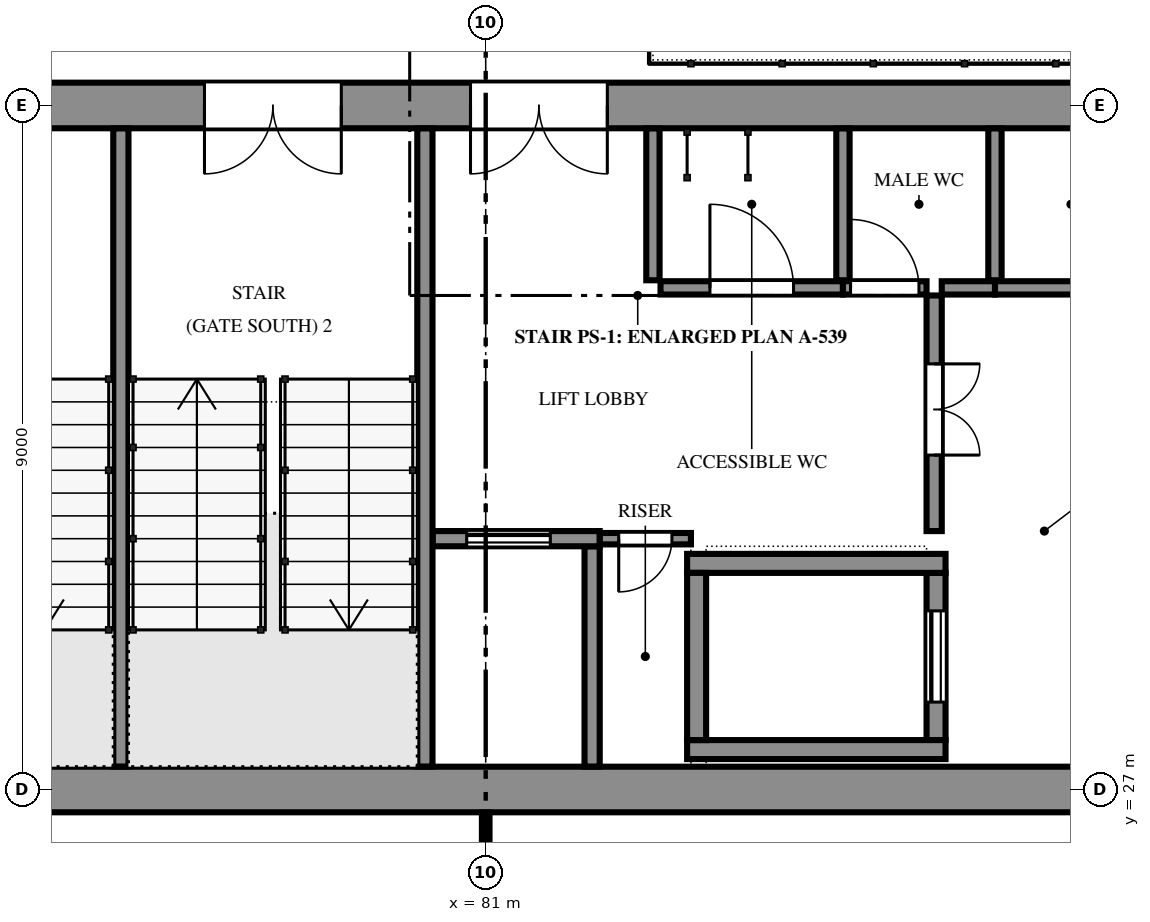
"""IFC4 building model, lengths in metres.
Left out: names, types, materials, properties, quantities, classifications, styles, units other than length and angle.
Written with IfcOpenShell. Run it as: python <this file> out.ifc"""

import sys

from ifc_helpers import new_model, si_unit, direction, frame, frame_2d, origin, place, context, subcontext, project, spatial, polyline, rectangle, outline, extrude, element, fill, save


model = new_model("IFC4")
c1 = context("Model", 3, precision=1e-05, world=origin(), true_north=direction((0.0, 1.0)))
c2 = subcontext(c1, "Body", "Model", "MODEL_VIEW")
j1 = project(units=[si_unit("LENGTHUNIT", "METRE"), si_unit("PLANEANGLEUNIT", "RADIAN")], contexts=[c1])
p1 = place(None, origin())
s1 = spatial("IfcSite", under=j1, at=p1, CompositionType="ELEMENT")
p2 = place(p1, origin())
s2 = spatial("IfcBuilding", under=s1, at=p2, CompositionType="ELEMENT")
p3 = place(p2, frame((0.0, 0.0, 7.5)))
s3 = spatial("IfcBuildingStorey", under=s2, at=p3, CompositionType="ELEMENT", Elevation=7.5)
p4 = place(p3, frame((71.7, 27.0, 0.0), z_axis=(0.0, 0.0, 1.0), x_axis=(1.0, 0.0, 0.0)))
e1 = element("IfcWall", 1, at=p4, inside=s3, PredefinedType="SOLIDWALL", context=c2, shape_type="SweptSolid", body=[
    extrude(rectangle(XDim=18.6, YDim=0.6, at=frame_2d((9.3, 0.0))), origin(), (0.0, 0.0, 1.0), 4.2),
])
p5 = place(p3, frame((71.7, 36.0, 0.0), z_axis=(0.0, 0.0, 1.0), x_axis=(1.0, 0.0, 0.0)))
e2 = element("IfcWall", 2, at=p5, inside=s3, PredefinedType="SOLIDWALL", context=c2, shape_type="SweptSolid", body=[
    extrude(rectangle(XDim=18.6, YDim=0.6, at=frame_2d((9.3, 0.0))), origin(), (0.0, 0.0, 1.0), 4.2),
])
p6 = place(p5, frame((1.6, 0.0, 0.0)))
e3 = element("IfcOpeningElement", 3, at=p6, cuts=e2, PredefinedType="OPENING", context=c2, shape_type="SweptSolid", body=[
    extrude(rectangle(XDim=1.8, YDim=2.1, at=frame_2d((0.9, 1.05))), frame((0.0, 0.31, 0.0), z_axis=(0.0, -1.0, 0.0), x_axis=(1.0, 0.0, 0.0)), (0.0, 0.0, 1.0), 0.62),
])
p7 = place(p5, frame((5.6, 0.0, 0.0)))
e4 = element("IfcOpeningElement", 4, at=p7, cuts=e2, PredefinedType="OPENING", context=c2, shape_type="SweptSolid", body=[
    extrude(rectangle(XDim=1.8, YDim=2.1, at=frame_2d((0.9, 1.05))), frame((0.0, 0.31, 0.0), z_axis=(0.0, -1.0, 0.0), x_axis=(1.0, 0.0, 0.0)), (0.0, 0.0, 1.0), 0.62),
])
p8 = place(p5, frame((9.1, 0.0, 0.0)))
e5 = element("IfcOpeningElement", 5, at=p8, cuts=e2, PredefinedType="OPENING", context=c2, shape_type="SweptSolid", body=[
    extrude(rectangle(XDim=1.8, YDim=2.1, at=frame_2d((0.9, 1.05))), frame((0.0, 0.31, 0.0), z_axis=(0.0, -1.0, 0.0), x_axis=(1.0, 0.0, 0.0)), (0.0, 0.0, 1.0), 0.62),
])
for number, where, z_axis, x_axis in (
    (6, (76.2, 27.302, -0.13), (0.0, 0.0, 1.0), (0.0, 1.0, 0.0)),
    (7, (80.2, 27.302, -0.13), (0.0, 0.0, 1.0), (0.0, 1.0, 0.0)),
):
    element("IfcWall", number, at=place(p3, frame(where, z_axis=z_axis, x_axis=x_axis)), inside=s3, PredefinedType="SOLIDWALL", context=c2, shape_type="SweptSolid", body=[
        extrude(rectangle(XDim=8.396, YDim=0.2, at=frame_2d((4.198, 0.0))), origin(), (0.0, 0.0, 1.0), 3.646),
    ])
p9 = place(p3, frame((80.302, 30.3, 0.0), z_axis=(0.0, 0.0, 1.0), x_axis=(1.0, 0.0, 0.0)))
e8 = element("IfcWall", 8, at=p9, inside=s3, PredefinedType="SOLIDWALL", context=c2, shape_type="SweptSolid", body=[
    extrude(rectangle(XDim=2.198, YDim=0.2, at=frame_2d((1.099, 0.0))), origin(), (0.0, 0.0, 1.0), 3.516),
])
p10 = place(p9, frame((0.448, 0.0, 0.0)))
e9 = element("IfcOpeningElement", 9, at=p10, cuts=e8, PredefinedType="OPENING", context=c2, shape_type="SweptSolid", body=[
    extrude(rectangle(XDim=1.1, YDim=2.1, at=frame_2d((0.55, 1.05))), frame((0.0, 0.11, 0.0), z_axis=(0.0, -1.0, 0.0), x_axis=(1.0, 0.0, 0.0)), (0.0, 0.0, 1.0), 0.22),
])
p11 = place(p3, frame((82.4, 27.302, 0.0), z_axis=(0.0, 0.0, 1.0), x_axis=(0.0, 1.0, 0.0)))
e10 = element("IfcWall", 10, at=p11, inside=s3, PredefinedType="SOLIDWALL", context=c2, shape_type="SweptSolid", body=[
    extrude(rectangle(XDim=2.898, YDim=0.2, at=frame_2d((1.449, 0.0))), origin(), (0.0, 0.0, 1.0), 3.516),
])
for number, where, z_axis, x_axis in (
    (11, (83.65, 27.525, 0.0), (0.0, 0.0, 1.0), (1.0, 0.0, 0.0)),
    (12, (83.65, 29.975, 0.0), (0.0, 0.0, 1.0), (1.0, 0.0, 0.0)),
):
    element("IfcWall", number, at=place(p3, frame(where, z_axis=z_axis, x_axis=x_axis)), inside=s3, PredefinedType="SOLIDWALL", context=c2, shape_type="SweptSolid", body=[
        extrude(rectangle(XDim=3.4, YDim=0.25, at=frame_2d((1.7, 0.0))), origin(), (0.0, 0.0, 1.0), 3.516),
    ])
p12 = place(p3, frame((83.775, 27.65, 0.0), z_axis=(0.0, 0.0, 1.0), x_axis=(0.0, 1.0, 0.0)))
e13 = element("IfcWall", 13, at=p12, inside=s3, PredefinedType="SOLIDWALL", context=c2, shape_type="SweptSolid", body=[
    extrude(rectangle(XDim=2.2, YDim=0.25, at=frame_2d((1.1, 0.0))), origin(), (0.0, 0.0, 1.0), 3.516),
])
p13 = place(p3, frame((86.925, 27.65, 0.0), z_axis=(0.0, 0.0, 1.0), x_axis=(0.0, 1.0, 0.0)))
e14 = element("IfcWall", 14, at=p13, inside=s3, PredefinedType="SOLIDWALL", context=c2, shape_type="SweptSolid", body=[
    extrude(rectangle(XDim=2.2, YDim=0.25, at=frame_2d((1.1, 0.0))), origin(), (0.0, 0.0, 1.0), 3.516),
])
p14 = place(p13, frame((0.5, 0.0, 0.0)))
e15 = element("IfcOpeningElement", 15, at=p14, cuts=e14, PredefinedType="OPENING", context=c2, shape_type="SweptSolid", body=[
    extrude(rectangle(XDim=1.2, YDim=2.1, at=frame_2d((0.6, 1.05))), frame((0.0, 0.135, 0.0), z_axis=(0.0, -1.0, 0.0), x_axis=(1.0, 0.0, 0.0)), (0.0, 0.0, 1.0), 0.27),
])
p15 = place(p3, frame((81.0, 26.698, 0.0), z_axis=(0.0, 0.0, 1.0), x_axis=(0.0, -1.0, 0.0)))
e16 = element("IfcWall", 16, at=p15, inside=s3, PredefinedType="PARTITIONING", context=c2, shape_type="SweptSolid", body=[
    extrude(rectangle(XDim=5.635, YDim=0.1, at=frame_2d((2.818, 0.0))), origin(), (0.0, 0.0, 1.0), 3.643),
])
p16 = place(p3, frame((83.7, 30.3, 0.0), z_axis=(0.0, 0.0, 1.0), x_axis=(-1.0, 0.0, 0.0)))
e17 = element("IfcWall", 17, at=p16, inside=s3, PredefinedType="SOLIDWALL", context=c2, shape_type="SweptSolid", body=[
    extrude(rectangle(XDim=1.198, YDim=0.15, at=frame_2d((0.599, 0.0))), origin(), (0.0, 0.0, 1.0), 3.516),
])
p17 = place(p16, frame((0.25, 0.0, 0.0)))
e18 = element("IfcOpeningElement", 18, at=p17, cuts=e17, PredefinedType="OPENING", context=c2, shape_type="SweptSolid", body=[
    extrude(rectangle(XDim=0.7, YDim=2.0, at=frame_2d((0.35, 1.0))), frame((0.0, 0.085, 0.0), z_axis=(0.0, -1.0, 0.0), x_axis=(1.0, 0.0, 0.0)), (0.0, 0.0, 1.0), 0.17),
])
p18 = place(p3, frame((86.9, 33.5, 0.0), z_axis=(0.0, 0.0, 1.0), x_axis=(0.0, -1.0, 0.0)))
e19 = element("IfcWall", 19, at=p18, inside=s3, PredefinedType="PARTITIONING", context=c2, shape_type="SweptSolid", body=[
    extrude(rectangle(XDim=3.1, YDim=0.2, at=frame_2d((1.55, 0.0))), origin(), (0.0, 0.0, 1.0), 3.382),
])
p19 = place(p18, frame((0.9, 0.0, 0.0)))
e20 = element("IfcOpeningElement", 20, at=p19, cuts=e19, PredefinedType="OPENING", context=c2, shape_type="SweptSolid", body=[
    extrude(rectangle(XDim=1.2, YDim=2.1, at=frame_2d((0.6, 1.05))), frame((0.0, 0.11, 0.0), z_axis=(0.0, -1.0, 0.0), x_axis=(1.0, 0.0, 0.0)), (0.0, 0.0, 1.0), 0.22),
])
p20 = place(p3, frame((83.2, 35.698, 0.0), z_axis=(0.0, 0.0, 1.0), x_axis=(0.0, -1.0, 0.0)))
e21 = element("IfcWall", 21, at=p20, inside=s3, PredefinedType="PARTITIONING", context=c2, shape_type="SweptSolid", body=[
    extrude(rectangle(XDim=1.998, YDim=0.175, at=frame_2d((0.999, 0.0))), origin(), (0.0, 0.0, 1.0), 3.307),
])
p21 = place(p3, frame((83.3, 33.6, 0.0), z_axis=(0.0, 0.0, 1.0), x_axis=(1.0, 0.0, 0.0)))
e22 = element("IfcWall", 22, at=p21, inside=s3, PredefinedType="PARTITIONING", context=c2, shape_type="SweptSolid", body=[
    extrude(rectangle(XDim=2.4, YDim=0.175, at=frame_2d((1.2, 0.0))), origin(), (0.0, 0.0, 1.0), 3.307),
])
p22 = place(p21, frame((0.65, 0.0, 0.0)))
e23 = element("IfcOpeningElement", 23, at=p22, cuts=e22, PredefinedType="OPENING", context=c2, shape_type="SweptSolid", body=[
    extrude(rectangle(XDim=1.1, YDim=2.1, at=frame_2d((0.55, 1.05))), frame((0.0, 0.097, 0.0), z_axis=(0.0, -1.0, 0.0), x_axis=(1.0, 0.0, 0.0)), (0.0, 0.0, 1.0), 0.195),
])
p23 = place(p3, frame((85.7, 33.6, 0.0), z_axis=(0.0, 0.0, 1.0), x_axis=(1.0, 0.0, 0.0)))
e24 = element("IfcWall", 24, at=p23, inside=s3, PredefinedType="PARTITIONING", context=c2, shape_type="SweptSolid", body=[
    extrude(rectangle(XDim=1.1, YDim=0.175, at=frame_2d((0.55, 0.0))), origin(), (0.0, 0.0, 1.0), 3.307),
])
p24 = place(p23, frame((0.1, 0.0, 0.0)))
e25 = element("IfcOpeningElement", 25, at=p24, cuts=e24, PredefinedType="OPENING", context=c2, shape_type="SweptSolid", body=[
    extrude(rectangle(XDim=0.9, YDim=2.1, at=frame_2d((0.45, 1.05))), frame((0.0, 0.097, 0.0), z_axis=(0.0, -1.0, 0.0), x_axis=(1.0, 0.0, 0.0)), (0.0, 0.0, 1.0), 0.195),
])
p25 = place(p3, frame((87.7, 33.6, 0.0), z_axis=(0.0, 0.0, 1.0), x_axis=(1.0, 0.0, 0.0)))
e26 = element("IfcWall", 26, at=p25, inside=s3, PredefinedType="PARTITIONING", context=c2, shape_type="SweptSolid", body=[
    extrude(rectangle(XDim=1.998, YDim=0.175, at=frame_2d((0.999, 0.0))), origin(), (0.0, 0.0, 1.0), 3.307),
])
p26 = place(p3, frame((87.0, 33.6, 0.0), z_axis=(0.0, 0.0, 1.0), x_axis=(1.0, 0.0, 0.0)))
e27 = element("IfcWall", 27, at=p26, inside=s3, PredefinedType="PARTITIONING", context=c2, shape_type="SweptSolid", body=[
    extrude(rectangle(XDim=0.7, YDim=0.175, at=frame_2d((0.35, 0.0))), origin(), (0.0, 0.0, 1.0), 3.307),
])
for number, where, z_axis, x_axis in (
    (28, (85.7, 35.698, 0.0), (0.0, 0.0, 1.0), (0.0, -1.0, 0.0)),
    (29, (87.7, 35.698, 0.0), (0.0, 0.0, 1.0), (0.0, -1.0, 0.0)),
):
    element("IfcWall", number, at=place(p3, frame(where, z_axis=z_axis, x_axis=x_axis)), inside=s3, PredefinedType="PARTITIONING", context=c2, shape_type="SweptSolid", body=[
        extrude(rectangle(XDim=1.998, YDim=0.175, at=frame_2d((0.999, 0.0))), origin(), (0.0, 0.0, 1.0), 3.307),
    ])
p27 = place(p10, origin())
e30 = element("IfcDoor", 30, at=p27, inside=s3, OperationType="SLIDING_TO_LEFT", PredefinedType="DOOR", context=c2, shape_type="SweptSolid", body=[
    extrude(outline(polyline([(0.0, 0.0), (0.07, 0.0), (0.07, 2.03), (1.03, 2.03), (1.03, 0.0), (1.1, 0.0), (1.1, 2.1), (0.0, 2.1), (0.0, 0.0)])), frame((0.0, 0.025, 0.0), z_axis=(0.0, -1.0, 0.0), x_axis=(1.0, 0.0, 0.0)), (0.0, 0.0, 1.0), 0.05),
    extrude(rectangle(XDim=0.524, YDim=2.016, at=frame_2d((0.336, 1.018))), frame((0.0, 0.018, 0.0), z_axis=(0.0, -1.0, 0.0), x_axis=(1.0, 0.0, 0.0)), (0.0, 0.0, 1.0), 0.016),
    extrude(rectangle(XDim=0.52, YDim=2.016, at=frame_2d((0.766, 1.018))), frame((0.0, -0.002, 0.0), z_axis=(0.0, -1.0, 0.0), x_axis=(1.0, 0.0, 0.0)), (0.0, 0.0, 1.0), 0.016),
])
fill(e9, e30)
p28 = place(p14, origin())
e31 = element("IfcDoor", 31, at=p28, inside=s3, OperationType="SLIDING_TO_LEFT", PredefinedType="DOOR", context=c2, shape_type="SweptSolid", body=[
    extrude(outline(polyline([(0.0, 0.0), (0.07, 0.0), (0.07, 2.03), (1.13, 2.03), (1.13, 0.0), (1.2, 0.0), (1.2, 2.1), (0.0, 2.1), (0.0, 0.0)])), frame((0.0, 0.025, 0.0), z_axis=(0.0, -1.0, 0.0), x_axis=(1.0, 0.0, 0.0)), (0.0, 0.0, 1.0), 0.05),
    extrude(rectangle(XDim=0.579, YDim=2.016, at=frame_2d((0.363, 1.018))), frame((0.0, 0.018, 0.0), z_axis=(0.0, -1.0, 0.0), x_axis=(1.0, 0.0, 0.0)), (0.0, 0.0, 1.0), 0.016),
    extrude(rectangle(XDim=0.575, YDim=2.016, at=frame_2d((0.839, 1.018))), frame((0.0, -0.002, 0.0), z_axis=(0.0, -1.0, 0.0), x_axis=(1.0, 0.0, 0.0)), (0.0, 0.0, 1.0), 0.016),
])
fill(e15, e31)
p29 = place(p7, frame((1.8, 0.0, 0.0), z_axis=(0.0, 0.0, 1.0), x_axis=(-1.0, 0.0, 0.0)))
e32 = element("IfcDoor", 32, at=p29, inside=s3, OperationType="DOUBLE_DOOR_SINGLE_SWING", PredefinedType="DOOR", context=c2, shape_type="SweptSolid", body=[
    extrude(outline(polyline([(0.0, 0.0), (0.07, 0.0), (0.07, 2.03), (1.73, 2.03), (1.73, 0.0), (1.8, 0.0), (1.8, 2.1), (0.0, 2.1), (0.0, 0.0)])), frame((0.0, 0.025, 0.0), z_axis=(0.0, -1.0, 0.0), x_axis=(1.0, 0.0, 0.0)), (0.0, 0.0, 1.0), 0.05),
    extrude(outline(polyline([(0.074, 0.01), (0.897, 0.01), (0.897, 2.026), (0.074, 2.026), (0.074, 0.01)]), holes=[polyline([(0.194, 0.16), (0.777, 0.16), (0.777, 1.01), (0.194, 1.01), (0.194, 0.16)]), polyline([(0.335, 1.16), (0.635, 1.16), (0.635, 1.76), (0.335, 1.76), (0.335, 1.16)])]), frame((0.0, 0.017, 0.0), z_axis=(0.0, -1.0, 0.0), x_axis=(1.0, 0.0, 0.0)), (0.0, 0.0, 1.0), 0.035),
    extrude(rectangle(XDim=0.583, YDim=0.85, at=frame_2d((0.485, 0.585))), frame((0.0, 0.009, 0.0), z_axis=(0.0, -1.0, 0.0), x_axis=(1.0, 0.0, 0.0)), (0.0, 0.0, 1.0), 0.017),
    extrude(rectangle(XDim=0.3, YDim=0.6, at=frame_2d((0.485, 1.46))), frame((0.0, 0.006, 0.0), z_axis=(0.0, -1.0, 0.0), x_axis=(1.0, 0.0, 0.0)), (0.0, 0.0, 1.0), 0.012),
    extrude(outline(polyline([(0.903, 0.01), (1.726, 0.01), (1.726, 2.026), (0.903, 2.026), (0.903, 0.01)]), holes=[polyline([(1.023, 0.16), (1.606, 0.16), (1.606, 1.01), (1.023, 1.01), (1.023, 0.16)]), polyline([(1.165, 1.16), (1.465, 1.16), (1.465, 1.76), (1.165, 1.76), (1.165, 1.16)])]), frame((0.0, 0.017, 0.0), z_axis=(0.0, -1.0, 0.0), x_axis=(1.0, 0.0, 0.0)), (0.0, 0.0, 1.0), 0.035),
    extrude(rectangle(XDim=0.583, YDim=0.85, at=frame_2d((1.314, 0.585))), frame((0.0, 0.009, 0.0), z_axis=(0.0, -1.0, 0.0), x_axis=(1.0, 0.0, 0.0)), (0.0, 0.0, 1.0), 0.017),
    extrude(rectangle(XDim=0.3, YDim=0.6, at=frame_2d((1.314, 1.46))), frame((0.0, 0.006, 0.0), z_axis=(0.0, -1.0, 0.0), x_axis=(1.0, 0.0, 0.0)), (0.0, 0.0, 1.0), 0.012),
])
fill(e4, e32)
p30 = place(p8, frame((1.8, 0.0, 0.0), z_axis=(0.0, 0.0, 1.0), x_axis=(-1.0, 0.0, 0.0)))
e33 = element("IfcDoor", 33, at=p30, inside=s3, OperationType="DOUBLE_DOOR_SINGLE_SWING", PredefinedType="DOOR", context=c2, shape_type="SweptSolid", body=[
    extrude(outline(polyline([(0.0, 0.0), (0.07, 0.0), (0.07, 2.03), (1.73, 2.03), (1.73, 0.0), (1.8, 0.0), (1.8, 2.1), (0.0, 2.1), (0.0, 0.0)])), frame((0.0, 0.025, 0.0), z_axis=(0.0, -1.0, 0.0), x_axis=(1.0, 0.0, 0.0)), (0.0, 0.0, 1.0), 0.05),
    extrude(outline(polyline([(0.074, 0.01), (0.897, 0.01), (0.897, 2.026), (0.074, 2.026), (0.074, 0.01)]), holes=[polyline([(0.194, 0.16), (0.777, 0.16), (0.777, 1.01), (0.194, 1.01), (0.194, 0.16)]), polyline([(0.335, 1.16), (0.635, 1.16), (0.635, 1.76), (0.335, 1.76), (0.335, 1.16)])]), frame((0.0, 0.017, 0.0), z_axis=(0.0, -1.0, 0.0), x_axis=(1.0, 0.0, 0.0)), (0.0, 0.0, 1.0), 0.035),
    extrude(rectangle(XDim=0.583, YDim=0.85, at=frame_2d((0.485, 0.585))), frame((0.0, 0.009, 0.0), z_axis=(0.0, -1.0, 0.0), x_axis=(1.0, 0.0, 0.0)), (0.0, 0.0, 1.0), 0.017),
    extrude(rectangle(XDim=0.3, YDim=0.6, at=frame_2d((0.485, 1.46))), frame((0.0, 0.006, 0.0), z_axis=(0.0, -1.0, 0.0), x_axis=(1.0, 0.0, 0.0)), (0.0, 0.0, 1.0), 0.012),
    extrude(outline(polyline([(0.903, 0.01), (1.726, 0.01), (1.726, 2.026), (0.903, 2.026), (0.903, 0.01)]), holes=[polyline([(1.023, 0.16), (1.606, 0.16), (1.606, 1.01), (1.023, 1.01), (1.023, 0.16)]), polyline([(1.165, 1.16), (1.465, 1.16), (1.465, 1.76), (1.165, 1.76), (1.165, 1.16)])]), frame((0.0, 0.017, 0.0), z_axis=(0.0, -1.0, 0.0), x_axis=(1.0, 0.0, 0.0)), (0.0, 0.0, 1.0), 0.035),
    extrude(rectangle(XDim=0.583, YDim=0.85, at=frame_2d((1.314, 0.585))), frame((0.0, 0.009, 0.0), z_axis=(0.0, -1.0, 0.0), x_axis=(1.0, 0.0, 0.0)), (0.0, 0.0, 1.0), 0.017),
    extrude(rectangle(XDim=0.3, YDim=0.6, at=frame_2d((1.314, 1.46))), frame((0.0, 0.006, 0.0), z_axis=(0.0, -1.0, 0.0), x_axis=(1.0, 0.0, 0.0)), (0.0, 0.0, 1.0), 0.012),
])
fill(e5, e33)
p31 = place(p19, origin())
e34 = element("IfcDoor", 34, at=p31, inside=s3, OperationType="DOUBLE_DOOR_SINGLE_SWING", PredefinedType="DOOR", context=c2, shape_type="SweptSolid", body=[
    extrude(outline(polyline([(0.0, 0.0), (0.07, 0.0), (0.07, 2.03), (1.13, 2.03), (1.13, 0.0), (1.2, 0.0), (1.2, 2.1), (0.0, 2.1), (0.0, 0.0)])), frame((0.0, 0.025, 0.0), z_axis=(0.0, -1.0, 0.0), x_axis=(1.0, 0.0, 0.0)), (0.0, 0.0, 1.0), 0.05),
    extrude(outline(polyline([(0.074, 0.01), (0.597, 0.01), (0.597, 2.026), (0.074, 2.026), (0.074, 0.01)]), holes=[polyline([(0.178, 0.373), (0.492, 0.373), (0.492, 1.784), (0.178, 1.784), (0.178, 0.373)])]), frame((0.0, 0.017, 0.0), z_axis=(0.0, -1.0, 0.0), x_axis=(1.0, 0.0, 0.0)), (0.0, 0.0, 1.0), 0.035),
    extrude(rectangle(XDim=0.314, YDim=1.411, at=frame_2d((0.335, 1.079))), frame((0.0, 0.009, 0.0), z_axis=(0.0, -1.0, 0.0), x_axis=(1.0, 0.0, 0.0)), (0.0, 0.0, 1.0), 0.017),
    extrude(outline(polyline([(0.603, 0.01), (1.126, 0.01), (1.126, 2.026), (0.603, 2.026), (0.603, 0.01)]), holes=[polyline([(0.708, 0.373), (1.021, 0.373), (1.021, 1.784), (0.708, 1.784), (0.708, 0.373)])]), frame((0.0, 0.017, 0.0), z_axis=(0.0, -1.0, 0.0), x_axis=(1.0, 0.0, 0.0)), (0.0, 0.0, 1.0), 0.035),
    extrude(rectangle(XDim=0.314, YDim=1.411, at=frame_2d((0.865, 1.079))), frame((0.0, 0.009, 0.0), z_axis=(0.0, -1.0, 0.0), x_axis=(1.0, 0.0, 0.0)), (0.0, 0.0, 1.0), 0.017),
])
fill(e20, e34)
p32 = place(p17, origin())
e35 = element("IfcDoor", 35, at=p32, inside=s3, OperationType="SINGLE_SWING_RIGHT", PredefinedType="DOOR", context=c2, shape_type="SweptSolid", body=[
    extrude(outline(polyline([(0.0, 0.0), (0.07, 0.0), (0.07, 1.93), (0.63, 1.93), (0.63, 0.0), (0.7, 0.0), (0.7, 2.0), (0.0, 2.0), (0.0, 0.0)])), frame((0.0, 0.025, 0.0), z_axis=(0.0, -1.0, 0.0), x_axis=(1.0, 0.0, 0.0)), (0.0, 0.0, 1.0), 0.05),
    extrude(outline(polyline([(0.074, 0.01), (0.626, 0.01), (0.626, 1.926), (0.074, 1.926), (0.074, 0.01)]), holes=[polyline([(0.184, 0.16), (0.516, 0.16), (0.516, 1.01), (0.184, 1.01), (0.184, 0.16)]), polyline([(0.2, 1.16), (0.5, 1.16), (0.5, 1.76), (0.2, 1.76), (0.2, 1.16)])]), frame((0.0, 0.017, 0.0), z_axis=(0.0, -1.0, 0.0), x_axis=(1.0, 0.0, 0.0)), (0.0, 0.0, 1.0), 0.035),
    extrude(rectangle(XDim=0.331, YDim=0.85, at=frame_2d((0.35, 0.585))), frame((0.0, 0.009, 0.0), z_axis=(0.0, -1.0, 0.0), x_axis=(1.0, 0.0, 0.0)), (0.0, 0.0, 1.0), 0.017),
    extrude(rectangle(XDim=0.3, YDim=0.6, at=frame_2d((0.35, 1.46))), frame((0.0, 0.006, 0.0), z_axis=(0.0, -1.0, 0.0), x_axis=(1.0, 0.0, 0.0)), (0.0, 0.0, 1.0), 0.012),
])
fill(e18, e35)
p33 = place(p22, origin())
e36 = element("IfcDoor", 36, at=p33, inside=s3, OperationType="SINGLE_SWING_LEFT", PredefinedType="DOOR", context=c2, shape_type="SweptSolid", body=[
    extrude(outline(polyline([(0.0, 0.0), (0.07, 0.0), (0.07, 2.03), (1.03, 2.03), (1.03, 0.0), (1.1, 0.0), (1.1, 2.1), (0.0, 2.1), (0.0, 0.0)])), frame((0.0, 0.025, 0.0), z_axis=(0.0, -1.0, 0.0), x_axis=(1.0, 0.0, 0.0)), (0.0, 0.0, 1.0), 0.05),
    extrude(outline(polyline([(0.074, 0.01), (1.026, 0.01), (1.026, 2.026), (0.074, 2.026), (0.074, 0.01)]), holes=[polyline([(0.194, 0.16), (0.906, 0.16), (0.906, 1.01), (0.194, 1.01), (0.194, 0.16)]), polyline([(0.4, 1.16), (0.7, 1.16), (0.7, 1.76), (0.4, 1.76), (0.4, 1.16)])]), frame((0.0, 0.017, 0.0), z_axis=(0.0, -1.0, 0.0), x_axis=(1.0, 0.0, 0.0)), (0.0, 0.0, 1.0), 0.035),
    extrude(rectangle(XDim=0.712, YDim=0.85, at=frame_2d((0.55, 0.585))), frame((0.0, 0.009, 0.0), z_axis=(0.0, -1.0, 0.0), x_axis=(1.0, 0.0, 0.0)), (0.0, 0.0, 1.0), 0.017),
    extrude(rectangle(XDim=0.3, YDim=0.6, at=frame_2d((0.55, 1.46))), frame((0.0, 0.006, 0.0), z_axis=(0.0, -1.0, 0.0), x_axis=(1.0, 0.0, 0.0)), (0.0, 0.0, 1.0), 0.012),
])
fill(e23, e36)
p34 = place(p24, origin())
e37 = element("IfcDoor", 37, at=p34, inside=s3, OperationType="SINGLE_SWING_LEFT", PredefinedType="DOOR", context=c2, shape_type="SweptSolid", body=[
    extrude(outline(polyline([(0.0, 0.0), (0.07, 0.0), (0.07, 2.03), (0.83, 2.03), (0.83, 0.0), (0.9, 0.0), (0.9, 2.1), (0.0, 2.1), (0.0, 0.0)])), frame((0.0, 0.025, 0.0), z_axis=(0.0, -1.0, 0.0), x_axis=(1.0, 0.0, 0.0)), (0.0, 0.0, 1.0), 0.05),
    extrude(outline(polyline([(0.074, 0.01), (0.826, 0.01), (0.826, 2.026), (0.074, 2.026), (0.074, 0.01)]), holes=[polyline([(0.194, 0.16), (0.706, 0.16), (0.706, 1.01), (0.194, 1.01), (0.194, 0.16)]), polyline([(0.3, 1.16), (0.6, 1.16), (0.6, 1.76), (0.3, 1.76), (0.3, 1.16)])]), frame((0.0, 0.017, 0.0), z_axis=(0.0, -1.0, 0.0), x_axis=(1.0, 0.0, 0.0)), (0.0, 0.0, 1.0), 0.035),
    extrude(rectangle(XDim=0.512, YDim=0.85, at=frame_2d((0.45, 0.585))), frame((0.0, 0.009, 0.0), z_axis=(0.0, -1.0, 0.0), x_axis=(1.0, 0.0, 0.0)), (0.0, 0.0, 1.0), 0.017),
    extrude(rectangle(XDim=0.3, YDim=0.6, at=frame_2d((0.45, 1.46))), frame((0.0, 0.006, 0.0), z_axis=(0.0, -1.0, 0.0), x_axis=(1.0, 0.0, 0.0)), (0.0, 0.0, 1.0), 0.012),
])
fill(e25, e37)
save(model, sys.argv[1])
